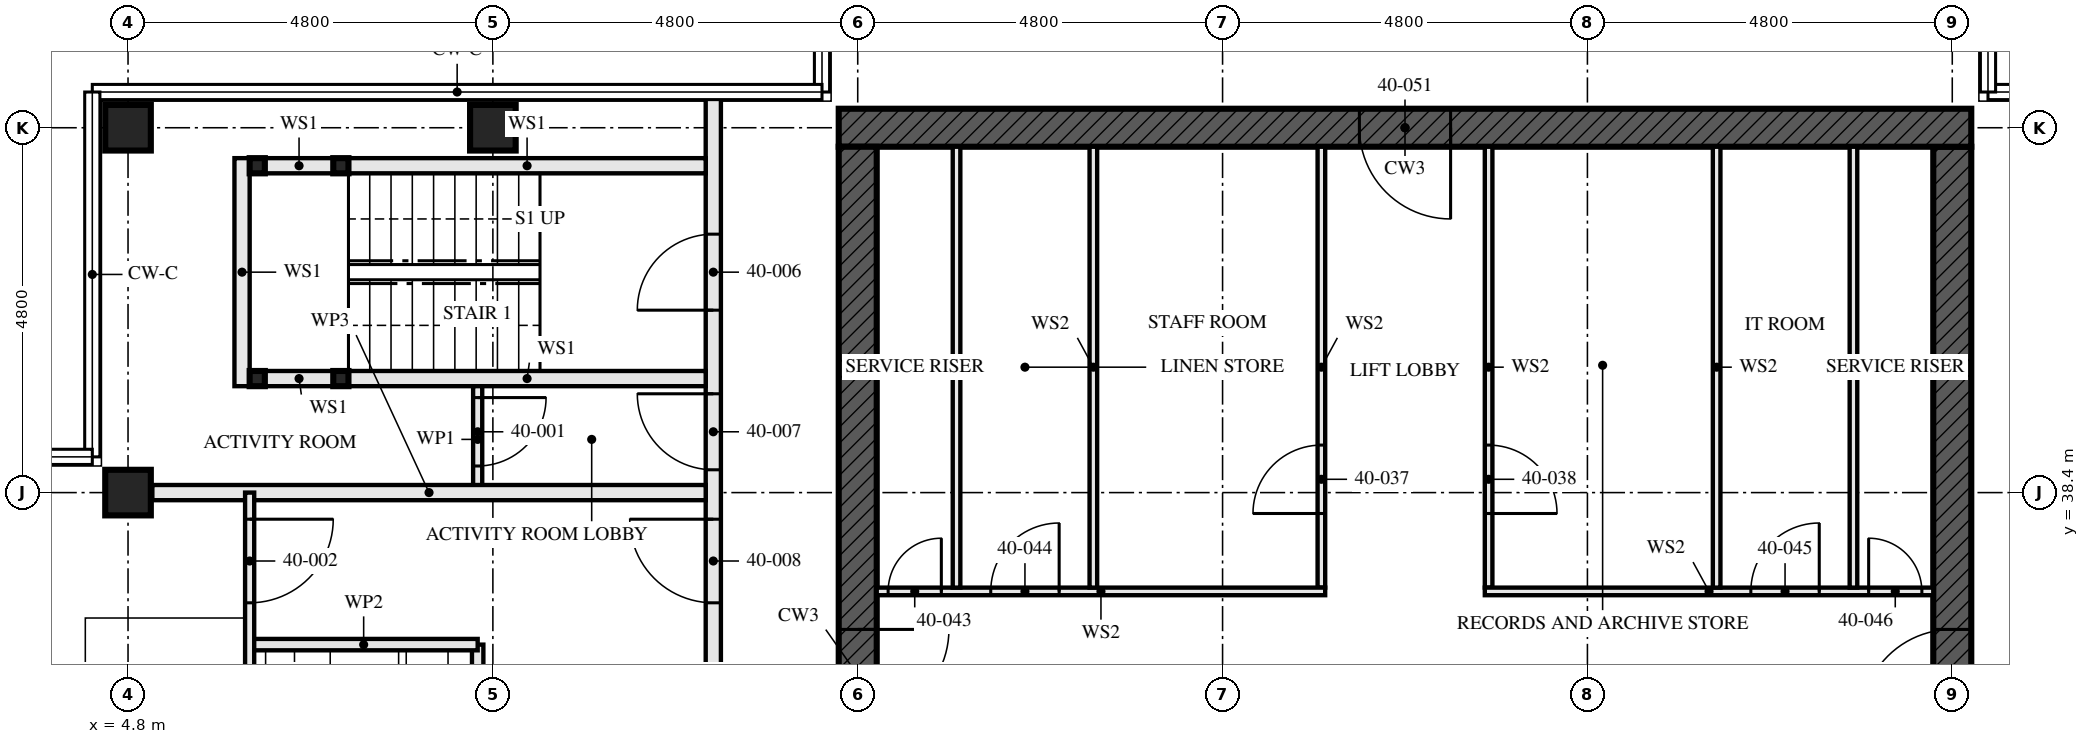
"""IFC4 building model, lengths in metres.
Left out: names, types, materials, properties, quantities, classifications, styles, units other than length and angle.
Written with IfcOpenShell. Run it as: python <this file> out.ifc"""

import sys

from ifc_helpers import new_model, si_unit, direction, frame, frame_2d, origin, origin_2d, place, context, subcontext, project, spatial, rectangle, hollow_rectangle, extrude, element, fill, save


model = new_model("IFC4")
c1 = context("Model", 3, precision=1e-05, world=origin(), true_north=direction((0.0, 1.0)))
c2 = subcontext(c1, "Body", "Model", "MODEL_VIEW")
j1 = project(units=[si_unit("LENGTHUNIT", "METRE"), si_unit("PLANEANGLEUNIT", "RADIAN")], contexts=[c1])
p1 = place(None, origin())
s1 = spatial("IfcSite", under=j1, at=p1, CompositionType="ELEMENT")
p2 = place(p1, origin())
s2 = spatial("IfcBuilding", under=s1, at=p2, CompositionType="ELEMENT")
p3 = place(p2, frame((0.0, 0.0, 148.0)))
s3 = spatial("IfcBuildingStorey", under=s2, at=p3, CompositionType="ELEMENT", Elevation=148.0)
for number, where, z_axis, x_axis in (
    (1, (4.8, 38.4, 0.0), (0.0, 0.0, 1.0), (0.0, 1.0, 0.0)),
    (2, (4.8, 43.2, 0.0), (0.0, 0.0, 1.0), (0.0, 1.0, 0.0)),
    (3, (9.6, 43.2, 0.0), (0.0, 0.0, 1.0), (0.0, 1.0, 0.0)),
):
    element("IfcColumn", number, at=place(p3, frame(where, z_axis=z_axis, x_axis=x_axis)), inside=s3, PredefinedType="COLUMN", context=c2, shape_type="SweptSolid", body=[
        extrude(hollow_rectangle(XDim=0.6, YDim=0.6, WallThickness=0.08, at=origin_2d()), origin(), (0.0, 0.0, 1.0), 3.5),
    ])
p4 = place(p3, frame((29.05, 43.2, -0.17), z_axis=(0.0, 0.0, 1.0), x_axis=(-1.0, 0.0, 0.0)))
e4 = element("IfcWall", 4, at=p4, inside=s3, PredefinedType="SHEAR", context=c2, shape_type="SweptSolid", body=[
    extrude(rectangle(XDim=14.9, YDim=0.5, at=frame_2d((7.45, 0.0))), origin(), (0.0, 0.0, 1.0), 3.5),
])
p5 = place(p4, frame((6.85, 0.0, 0.17)))
e5 = element("IfcOpeningElement", 5, at=p5, cuts=e4, PredefinedType="OPENING", context=c2, shape_type="SweptSolid", body=[
    extrude(rectangle(XDim=1.2, YDim=2.1, at=frame_2d((0.6, 1.05))), frame((0.0, 0.26, 0.0), z_axis=(0.0, -1.0, 0.0), x_axis=(1.0, 0.0, 0.0)), (0.0, 0.0, 1.0), 0.521),
])
p6 = place(p3, frame((14.4, 42.95, -0.17), z_axis=(0.0, 0.0, 1.0), x_axis=(0.0, -1.0, 0.0)))
e6 = element("IfcWall", 6, at=p6, inside=s3, PredefinedType="SHEAR", context=c2, shape_type="SweptSolid", body=[
    extrude(rectangle(XDim=13.9, YDim=0.5, at=frame_2d((6.95, 0.0))), origin(), (0.0, 0.0, 1.0), 3.5),
])
p7 = place(p6, frame((6.35, 0.0, 0.17)))
e7 = element("IfcOpeningElement", 7, at=p7, cuts=e6, PredefinedType="OPENING", context=c2, shape_type="SweptSolid", body=[
    extrude(rectangle(XDim=1.2, YDim=2.1, at=frame_2d((0.6, 1.05))), frame((0.0, 0.26, 0.0), z_axis=(0.0, -1.0, 0.0), x_axis=(1.0, 0.0, 0.0)), (0.0, 0.0, 1.0), 0.521),
])
p8 = place(p3, frame((28.8, 29.05, -0.17), z_axis=(0.0, 0.0, 1.0), x_axis=(0.0, 1.0, 0.0)))
e8 = element("IfcWall", 8, at=p8, inside=s3, PredefinedType="SHEAR", context=c2, shape_type="SweptSolid", body=[
    extrude(rectangle(XDim=13.9, YDim=0.5, at=frame_2d((6.95, 0.0))), origin(), (0.0, 0.0, 1.0), 3.5),
])
p9 = place(p8, frame((6.35, 0.0, 0.17)))
e9 = element("IfcOpeningElement", 9, at=p9, cuts=e8, PredefinedType="OPENING", context=c2, shape_type="SweptSolid", body=[
    extrude(rectangle(XDim=1.2, YDim=2.1, at=frame_2d((0.6, 1.05))), frame((0.0, 0.26, 0.0), z_axis=(0.0, -1.0, 0.0), x_axis=(1.0, 0.0, 0.0)), (0.0, 0.0, 1.0), 0.521),
])
for number, where, z_axis, x_axis in (
    (10, (6.5, 42.7, 0.0), (0.0, 0.0, 1.0), (1.0, 0.0, 0.0)),
    (11, (6.5, 39.9, 0.0), (0.0, 0.0, 1.0), (1.0, 0.0, 0.0)),
    (12, (7.6, 42.7, 0.0), (0.0, 0.0, 1.0), (1.0, 0.0, 0.0)),
    (13, (7.6, 39.9, 0.0), (0.0, 0.0, 1.0), (1.0, 0.0, 0.0)),
):
    element("IfcColumn", number, at=place(p3, frame(where, z_axis=z_axis, x_axis=x_axis)), inside=s3, PredefinedType="COLUMN", context=c2, shape_type="SweptSolid", body=[
        extrude(hollow_rectangle(XDim=0.2, YDim=0.2, WallThickness=0.008, at=origin_2d()), origin(), (0.0, 0.0, 1.0), 3.33),
    ])
p10 = place(p3, frame((6.6, 42.7, 0.0), z_axis=(0.0, 0.0, 1.0), x_axis=(1.0, 0.0, 0.0)))
e14 = element("IfcWall", 14, at=p10, inside=s3, PredefinedType="SOLIDWALL", context=c2, shape_type="SweptSolid", body=[
    extrude(rectangle(XDim=0.9, YDim=0.2, at=frame_2d((0.45, 0.0))), origin(), (0.0, 0.0, 1.0), 2.99),
])
p11 = place(p3, frame((7.7, 42.7, 0.0), z_axis=(0.0, 0.0, 1.0), x_axis=(1.0, 0.0, 0.0)))
e15 = element("IfcWall", 15, at=p11, inside=s3, PredefinedType="SOLIDWALL", context=c2, shape_type="SweptSolid", body=[
    extrude(rectangle(XDim=4.7, YDim=0.2, at=frame_2d((2.35, 0.0))), origin(), (0.0, 0.0, 1.0), 2.99),
])
p12 = place(p3, frame((6.6, 39.9, 0.0), z_axis=(0.0, 0.0, 1.0), x_axis=(1.0, 0.0, 0.0)))
e16 = element("IfcWall", 16, at=p12, inside=s3, PredefinedType="SOLIDWALL", context=c2, shape_type="SweptSolid", body=[
    extrude(rectangle(XDim=0.9, YDim=0.2, at=frame_2d((0.45, 0.0))), origin(), (0.0, 0.0, 1.0), 2.99),
])
p13 = place(p3, frame((7.7, 39.9, 0.0), z_axis=(0.0, 0.0, 1.0), x_axis=(1.0, 0.0, 0.0)))
e17 = element("IfcWall", 17, at=p13, inside=s3, PredefinedType="SOLIDWALL", context=c2, shape_type="SweptSolid", body=[
    extrude(rectangle(XDim=4.7, YDim=0.2, at=frame_2d((2.35, 0.0))), origin(), (0.0, 0.0, 1.0), 2.99),
])
p14 = place(p3, frame((6.3, 42.8, 0.0), z_axis=(0.0, 0.0, 1.0), x_axis=(0.0, -1.0, 0.0)))
e18 = element("IfcWall", 18, at=p14, inside=s3, PredefinedType="SOLIDWALL", context=c2, shape_type="SweptSolid", body=[
    extrude(rectangle(XDim=3.0, YDim=0.2, at=frame_2d((1.5, 0.0))), origin(), (0.0, 0.0, 1.0), 3.33),
])
p15 = place(p3, frame((9.4, 39.8, 0.0), z_axis=(0.0, 0.0, 1.0), x_axis=(0.0, -1.0, 0.0)))
e19 = element("IfcWall", 19, at=p15, inside=s3, PredefinedType="PARTITIONING", context=c2, shape_type="SweptSolid", body=[
    extrude(rectangle(XDim=1.4, YDim=0.12, at=frame_2d((0.7, 0.0))), origin(), (0.0, 0.0, 1.0), 3.33),
])
p16 = place(p15, frame((0.15, 0.0, 0.0)))
e20 = element("IfcOpeningElement", 20, at=p16, cuts=e19, PredefinedType="OPENING", context=c2, shape_type="SweptSolid", body=[
    extrude(rectangle(XDim=0.9, YDim=2.1, at=frame_2d((0.45, 1.05))), frame((0.0, 0.071, 0.0), z_axis=(0.0, -1.0, 0.0), x_axis=(1.0, 0.0, 0.0)), (0.0, 0.0, 1.0), 0.141),
])
p17 = place(p3, frame((5.12, 38.4, 0.0), z_axis=(0.0, 0.0, 1.0), x_axis=(1.0, 0.0, 0.0)))
e21 = element("IfcWall", 21, at=p17, inside=s3, PredefinedType="PARTITIONING", context=c2, shape_type="SweptSolid", body=[
    extrude(rectangle(XDim=7.28, YDim=0.2, at=frame_2d((3.64, 0.0))), origin(), (0.0, 0.0, 1.0), 2.55),
])
p18 = place(p3, frame((6.4, 36.4, 0.0), z_axis=(0.0, 0.0, 1.0), x_axis=(1.0, 0.0, 0.0)))
e22 = element("IfcWall", 22, at=p18, inside=s3, PredefinedType="PARTITIONING", context=c2, shape_type="SweptSolid", body=[
    extrude(rectangle(XDim=3.0, YDim=0.15, at=frame_2d((1.5, 0.0))), origin(), (0.0, 0.0, 1.0), 3.33),
])
p19 = place(p3, frame((9.4, 36.4, 0.0), z_axis=(0.0, 0.0, 1.0), x_axis=(0.0, -1.0, 0.0)))
e23 = element("IfcWall", 23, at=p19, inside=s3, PredefinedType="PARTITIONING", context=c2, shape_type="SweptSolid", body=[
    extrude(rectangle(XDim=2.8, YDim=0.15, at=frame_2d((1.4, 0.0))), origin(), (0.0, 0.0, 1.0), 3.33),
])
p20 = place(p3, frame((6.4, 38.4, 0.0), z_axis=(0.0, 0.0, 1.0), x_axis=(0.0, -1.0, 0.0)))
e24 = element("IfcWall", 24, at=p20, inside=s3, PredefinedType="PARTITIONING", context=c2, shape_type="SweptSolid", body=[
    extrude(rectangle(XDim=4.8, YDim=0.12, at=frame_2d((2.4, 0.0))), origin(), (0.0, 0.0, 1.0), 3.33),
])
p21 = place(p20, frame((0.35, 0.0, 0.0)))
e25 = element("IfcOpeningElement", 25, at=p21, cuts=e24, PredefinedType="OPENING", context=c2, shape_type="SweptSolid", body=[
    extrude(rectangle(XDim=1.1, YDim=2.1, at=frame_2d((0.55, 1.05))), frame((0.0, 0.071, 0.0), z_axis=(0.0, -1.0, 0.0), x_axis=(1.0, 0.0, 0.0)), (0.0, 0.0, 1.0), 0.141),
])
p22 = place(p20, frame((2.925, 0.0, 0.0)))
e26 = element("IfcOpeningElement", 26, at=p22, cuts=e24, PredefinedType="OPENING", context=c2, shape_type="SweptSolid", body=[
    extrude(rectangle(XDim=0.95, YDim=2.1, at=frame_2d((0.475, 1.05))), frame((0.0, 0.071, 0.0), z_axis=(0.0, -1.0, 0.0), x_axis=(1.0, 0.0, 0.0)), (0.0, 0.0, 1.0), 0.141),
])
p23 = place(p3, frame((12.5, 43.65, 0.0), z_axis=(0.0, 0.0, 1.0), x_axis=(0.0, -1.0, 0.0)))
e27 = element("IfcWall", 27, at=p23, inside=s3, PredefinedType="PARTITIONING", context=c2, shape_type="SweptSolid", body=[
    extrude(rectangle(XDim=15.3, YDim=0.2, at=frame_2d((7.65, 0.0))), origin(), (0.0, 0.0, 1.0), 2.32),
])
p24 = place(p23, frame((1.85, 0.0, 0.0)))
e28 = element("IfcOpeningElement", 28, at=p24, cuts=e27, PredefinedType="OPENING", context=c2, shape_type="SweptSolid", body=[
    extrude(rectangle(XDim=1.0, YDim=2.1, at=frame_2d((0.5, 1.05))), frame((0.0, 0.111, 0.0), z_axis=(0.0, -1.0, 0.0), x_axis=(1.0, 0.0, 0.0)), (0.0, 0.0, 1.0), 0.221),
])
p25 = place(p23, frame((3.95, 0.0, 0.0)))
e29 = element("IfcOpeningElement", 29, at=p25, cuts=e27, PredefinedType="OPENING", context=c2, shape_type="SweptSolid", body=[
    extrude(rectangle(XDim=1.0, YDim=2.1, at=frame_2d((0.5, 1.05))), frame((0.0, 0.111, 0.0), z_axis=(0.0, -1.0, 0.0), x_axis=(1.0, 0.0, 0.0)), (0.0, 0.0, 1.0), 0.221),
])
p26 = place(p23, frame((5.6, 0.0, 0.0)))
e30 = element("IfcOpeningElement", 30, at=p26, cuts=e27, PredefinedType="OPENING", context=c2, shape_type="SweptSolid", body=[
    extrude(rectangle(XDim=1.1, YDim=2.1, at=frame_2d((0.55, 1.05))), frame((0.0, 0.111, 0.0), z_axis=(0.0, -1.0, 0.0), x_axis=(1.0, 0.0, 0.0)), (0.0, 0.0, 1.0), 0.221),
])
p27 = place(p23, frame((13.4, 0.0, 0.0)))
e31 = element("IfcOpeningElement", 31, at=p27, cuts=e27, PredefinedType="OPENING", context=c2, shape_type="SweptSolid", body=[
    extrude(rectangle(XDim=1.1, YDim=2.1, at=frame_2d((0.55, 1.05))), frame((0.0, 0.111, 0.0), z_axis=(0.0, -1.0, 0.0), x_axis=(1.0, 0.0, 0.0)), (0.0, 0.0, 1.0), 0.221),
])
for number, where, z_axis, x_axis in (
    (32, (15.7, 37.15, 0.0), (0.0, 0.0, 1.0), (0.0, 1.0, 0.0)),
    (33, (27.5, 37.15, 0.0), (0.0, 0.0, 1.0), (0.0, 1.0, 0.0)),
):
    element("IfcWall", number, at=place(p3, frame(where, z_axis=z_axis, x_axis=x_axis)), inside=s3, PredefinedType="SOLIDWALL", context=c2, shape_type="SweptSolid", body=[
        extrude(rectangle(XDim=5.8, YDim=0.1, at=frame_2d((2.9, 0.0))), origin(), (0.0, 0.0, 1.0), 3.33),
    ])
p28 = place(p3, frame((20.5, 37.15, 0.0), z_axis=(0.0, 0.0, 1.0), x_axis=(0.0, 1.0, 0.0)))
e34 = element("IfcWall", 34, at=p28, inside=s3, PredefinedType="SOLIDWALL", context=c2, shape_type="SweptSolid", body=[
    extrude(rectangle(XDim=5.8, YDim=0.1, at=frame_2d((2.9, 0.0))), origin(), (0.0, 0.0, 1.0), 3.33),
])
p29 = place(p28, frame((0.975, 0.0, 0.0)))
e35 = element("IfcOpeningElement", 35, at=p29, cuts=e34, PredefinedType="OPENING", context=c2, shape_type="SweptSolid", body=[
    extrude(rectangle(XDim=0.9, YDim=2.1, at=frame_2d((0.45, 1.05))), frame((0.0, 0.061, 0.0), z_axis=(0.0, -1.0, 0.0), x_axis=(1.0, 0.0, 0.0)), (0.0, 0.0, 1.0), 0.121),
])
p30 = place(p3, frame((22.7, 37.15, 0.0), z_axis=(0.0, 0.0, 1.0), x_axis=(0.0, 1.0, 0.0)))
e36 = element("IfcWall", 36, at=p30, inside=s3, PredefinedType="SOLIDWALL", context=c2, shape_type="SweptSolid", body=[
    extrude(rectangle(XDim=5.8, YDim=0.1, at=frame_2d((2.9, 0.0))), origin(), (0.0, 0.0, 1.0), 3.33),
])
p31 = place(p30, frame((0.975, 0.0, 0.0)))
e37 = element("IfcOpeningElement", 37, at=p31, cuts=e36, PredefinedType="OPENING", context=c2, shape_type="SweptSolid", body=[
    extrude(rectangle(XDim=0.9, YDim=2.1, at=frame_2d((0.45, 1.05))), frame((0.0, 0.061, 0.0), z_axis=(0.0, -1.0, 0.0), x_axis=(1.0, 0.0, 0.0)), (0.0, 0.0, 1.0), 0.121),
])
p32 = place(p3, frame((14.65, 37.1, 0.0), z_axis=(0.0, 0.0, 1.0), x_axis=(1.0, 0.0, 0.0)))
e38 = element("IfcWall", 38, at=p32, inside=s3, PredefinedType="SOLIDWALL", context=c2, shape_type="SweptSolid", body=[
    extrude(rectangle(XDim=5.9, YDim=0.1, at=frame_2d((2.95, 0.0))), origin(), (0.0, 0.0, 1.0), 3.33),
])
p33 = place(p32, frame((0.15, 0.0, 0.0)))
e39 = element("IfcOpeningElement", 39, at=p33, cuts=e38, PredefinedType="OPENING", context=c2, shape_type="SweptSolid", body=[
    extrude(rectangle(XDim=0.7, YDim=2.1, at=frame_2d((0.35, 1.05))), frame((0.0, 0.061, 0.0), z_axis=(0.0, -1.0, 0.0), x_axis=(1.0, 0.0, 0.0)), (0.0, 0.0, 1.0), 0.121),
])
p34 = place(p32, frame((1.5, 0.0, 0.0)))
e40 = element("IfcOpeningElement", 40, at=p34, cuts=e38, PredefinedType="OPENING", context=c2, shape_type="SweptSolid", body=[
    extrude(rectangle(XDim=0.9, YDim=2.1, at=frame_2d((0.45, 1.05))), frame((0.0, 0.061, 0.0), z_axis=(0.0, -1.0, 0.0), x_axis=(1.0, 0.0, 0.0)), (0.0, 0.0, 1.0), 0.121),
])
p35 = place(p3, frame((22.65, 37.1, 0.0), z_axis=(0.0, 0.0, 1.0), x_axis=(1.0, 0.0, 0.0)))
e41 = element("IfcWall", 41, at=p35, inside=s3, PredefinedType="SOLIDWALL", context=c2, shape_type="SweptSolid", body=[
    extrude(rectangle(XDim=5.9, YDim=0.1, at=frame_2d((2.95, 0.0))), origin(), (0.0, 0.0, 1.0), 3.33),
])
p36 = place(p35, frame((3.5, 0.0, 0.0)))
e42 = element("IfcOpeningElement", 42, at=p36, cuts=e41, PredefinedType="OPENING", context=c2, shape_type="SweptSolid", body=[
    extrude(rectangle(XDim=0.9, YDim=2.1, at=frame_2d((0.45, 1.05))), frame((0.0, 0.061, 0.0), z_axis=(0.0, -1.0, 0.0), x_axis=(1.0, 0.0, 0.0)), (0.0, 0.0, 1.0), 0.121),
])
p37 = place(p35, frame((5.05, 0.0, 0.0)))
e43 = element("IfcOpeningElement", 43, at=p37, cuts=e41, PredefinedType="OPENING", context=c2, shape_type="SweptSolid", body=[
    extrude(rectangle(XDim=0.7, YDim=2.1, at=frame_2d((0.35, 1.05))), frame((0.0, 0.061, 0.0), z_axis=(0.0, -1.0, 0.0), x_axis=(1.0, 0.0, 0.0)), (0.0, 0.0, 1.0), 0.121),
])
for number, where, z_axis, x_axis in (
    (44, (17.5, 37.15, 0.0), (0.0, 0.0, 1.0), (0.0, 1.0, 0.0)),
    (45, (25.7, 37.15, 0.0), (0.0, 0.0, 1.0), (0.0, 1.0, 0.0)),
):
    element("IfcWall", number, at=place(p3, frame(where, z_axis=z_axis, x_axis=x_axis)), inside=s3, PredefinedType="SOLIDWALL", context=c2, shape_type="SweptSolid", body=[
        extrude(rectangle(XDim=5.8, YDim=0.1, at=frame_2d((2.9, 0.0))), origin(), (0.0, 0.0, 1.0), 3.33),
    ])
p38 = place(p16, origin())
e46 = element("IfcDoor", 46, at=p38, inside=s3, OperationType="SINGLE_SWING_RIGHT", PredefinedType="DOOR", context=c2, shape_type="SweptSolid", body=[
    extrude(rectangle(XDim=0.9, YDim=2.1, at=frame_2d((0.45, 1.05))), frame((0.0, 0.022, 0.0), z_axis=(0.0, -1.0, 0.0), x_axis=(1.0, 0.0, 0.0)), (0.0, 0.0, 1.0), 0.044),
])
fill(e20, e46)
p39 = place(p21, origin())
e47 = element("IfcDoor", 47, at=p39, inside=s3, OperationType="SINGLE_SWING_RIGHT", PredefinedType="DOOR", context=c2, shape_type="SweptSolid", body=[
    extrude(rectangle(XDim=1.1, YDim=2.1, at=frame_2d((0.55, 1.05))), frame((0.0, 0.022, 0.0), z_axis=(0.0, -1.0, 0.0), x_axis=(1.0, 0.0, 0.0)), (0.0, 0.0, 1.0), 0.044),
])
fill(e25, e47)
p40 = place(p24, frame((1.0, 0.0, 0.0), z_axis=(0.0, 0.0, 1.0), x_axis=(-1.0, 0.0, 0.0)))
e48 = element("IfcDoor", 48, at=p40, inside=s3, OperationType="SINGLE_SWING_RIGHT", PredefinedType="DOOR", context=c2, shape_type="SweptSolid", body=[
    extrude(rectangle(XDim=1.0, YDim=2.1, at=frame_2d((0.5, 1.05))), frame((0.0, 0.032, 0.0), z_axis=(0.0, -1.0, 0.0), x_axis=(1.0, 0.0, 0.0)), (0.0, 0.0, 1.0), 0.064),
])
fill(e28, e48)
p41 = place(p25, frame((1.0, 0.0, 0.0), z_axis=(0.0, 0.0, 1.0), x_axis=(-1.0, 0.0, 0.0)))
e49 = element("IfcDoor", 49, at=p41, inside=s3, OperationType="SINGLE_SWING_LEFT", PredefinedType="DOOR", context=c2, shape_type="SweptSolid", body=[
    extrude(rectangle(XDim=1.0, YDim=2.1, at=frame_2d((0.5, 1.05))), frame((0.0, 0.027, 0.0), z_axis=(0.0, -1.0, 0.0), x_axis=(1.0, 0.0, 0.0)), (0.0, 0.0, 1.0), 0.054),
])
fill(e29, e49)
p42 = place(p26, frame((1.1, 0.0, 0.0), z_axis=(0.0, 0.0, 1.0), x_axis=(-1.0, 0.0, 0.0)))
e50 = element("IfcDoor", 50, at=p42, inside=s3, OperationType="SINGLE_SWING_LEFT", PredefinedType="DOOR", context=c2, shape_type="SweptSolid", body=[
    extrude(rectangle(XDim=1.1, YDim=2.1, at=frame_2d((0.55, 1.05))), frame((0.0, 0.027, 0.0), z_axis=(0.0, -1.0, 0.0), x_axis=(1.0, 0.0, 0.0)), (0.0, 0.0, 1.0), 0.054),
])
fill(e30, e50)
p43 = place(p29, origin())
e51 = element("IfcDoor", 51, at=p43, inside=s3, OperationType="SINGLE_SWING_RIGHT", PredefinedType="DOOR", context=c2, shape_type="SweptSolid", body=[
    extrude(rectangle(XDim=0.9, YDim=2.1, at=frame_2d((0.45, 1.05))), frame((0.0, 0.027, 0.0), z_axis=(0.0, -1.0, 0.0), x_axis=(1.0, 0.0, 0.0)), (0.0, 0.0, 1.0), 0.054),
])
fill(e35, e51)
p44 = place(p31, frame((0.9, 0.0, 0.0), z_axis=(0.0, 0.0, 1.0), x_axis=(-1.0, 0.0, 0.0)))
e52 = element("IfcDoor", 52, at=p44, inside=s3, OperationType="SINGLE_SWING_LEFT", PredefinedType="DOOR", context=c2, shape_type="SweptSolid", body=[
    extrude(rectangle(XDim=0.9, YDim=2.1, at=frame_2d((0.45, 1.05))), frame((0.0, 0.027, 0.0), z_axis=(0.0, -1.0, 0.0), x_axis=(1.0, 0.0, 0.0)), (0.0, 0.0, 1.0), 0.054),
])
fill(e37, e52)
p45 = place(p33, origin())
e53 = element("IfcDoor", 53, at=p45, inside=s3, OperationType="SINGLE_SWING_LEFT", PredefinedType="DOOR", context=c2, shape_type="SweptSolid", body=[
    extrude(rectangle(XDim=0.7, YDim=2.1, at=frame_2d((0.35, 1.05))), frame((0.0, 0.027, 0.0), z_axis=(0.0, -1.0, 0.0), x_axis=(1.0, 0.0, 0.0)), (0.0, 0.0, 1.0), 0.054),
])
fill(e39, e53)
p46 = place(p34, origin())
e54 = element("IfcDoor", 54, at=p46, inside=s3, OperationType="SINGLE_SWING_LEFT", PredefinedType="DOOR", context=c2, shape_type="SweptSolid", body=[
    extrude(rectangle(XDim=0.9, YDim=2.1, at=frame_2d((0.45, 1.05))), frame((0.0, 0.027, 0.0), z_axis=(0.0, -1.0, 0.0), x_axis=(1.0, 0.0, 0.0)), (0.0, 0.0, 1.0), 0.054),
])
fill(e40, e54)
p47 = place(p36, origin())
e55 = element("IfcDoor", 55, at=p47, inside=s3, OperationType="SINGLE_SWING_LEFT", PredefinedType="DOOR", context=c2, shape_type="SweptSolid", body=[
    extrude(rectangle(XDim=0.9, YDim=2.1, at=frame_2d((0.45, 1.05))), frame((0.0, 0.027, 0.0), z_axis=(0.0, -1.0, 0.0), x_axis=(1.0, 0.0, 0.0)), (0.0, 0.0, 1.0), 0.054),
])
fill(e42, e55)
p48 = place(p37, origin())
e56 = element("IfcDoor", 56, at=p48, inside=s3, OperationType="SINGLE_SWING_RIGHT", PredefinedType="DOOR", context=c2, shape_type="SweptSolid", body=[
    extrude(rectangle(XDim=0.7, YDim=2.1, at=frame_2d((0.35, 1.05))), frame((0.0, 0.027, 0.0), z_axis=(0.0, -1.0, 0.0), x_axis=(1.0, 0.0, 0.0)), (0.0, 0.0, 1.0), 0.054),
])
fill(e43, e56)
p49 = place(p7, origin())
e57 = element("IfcDoor", 57, at=p49, inside=s3, OperationType="SINGLE_SWING_LEFT", PredefinedType="DOOR", context=c2, shape_type="SweptSolid", body=[
    extrude(rectangle(XDim=1.2, YDim=2.1, at=frame_2d((0.6, 1.05))), frame((0.0, 0.027, 0.0), z_axis=(0.0, -1.0, 0.0), x_axis=(1.0, 0.0, 0.0)), (0.0, 0.0, 1.0), 0.054),
])
fill(e7, e57)
p50 = place(p9, origin())
e58 = element("IfcDoor", 58, at=p50, inside=s3, OperationType="SINGLE_SWING_LEFT", PredefinedType="DOOR", context=c2, shape_type="SweptSolid", body=[
    extrude(rectangle(XDim=1.2, YDim=2.1, at=frame_2d((0.6, 1.05))), frame((0.0, 0.027, 0.0), z_axis=(0.0, -1.0, 0.0), x_axis=(1.0, 0.0, 0.0)), (0.0, 0.0, 1.0), 0.054),
])
fill(e9, e58)
p51 = place(p5, origin())
e59 = element("IfcDoor", 59, at=p51, inside=s3, OperationType="SINGLE_SWING_LEFT", PredefinedType="DOOR", context=c2, shape_type="SweptSolid", body=[
    extrude(rectangle(XDim=1.2, YDim=2.1, at=frame_2d((0.6, 1.05))), frame((0.0, 0.027, 0.0), z_axis=(0.0, -1.0, 0.0), x_axis=(1.0, 0.0, 0.0)), (0.0, 0.0, 1.0), 0.054),
])
fill(e5, e59)
save(model, sys.argv[1])
